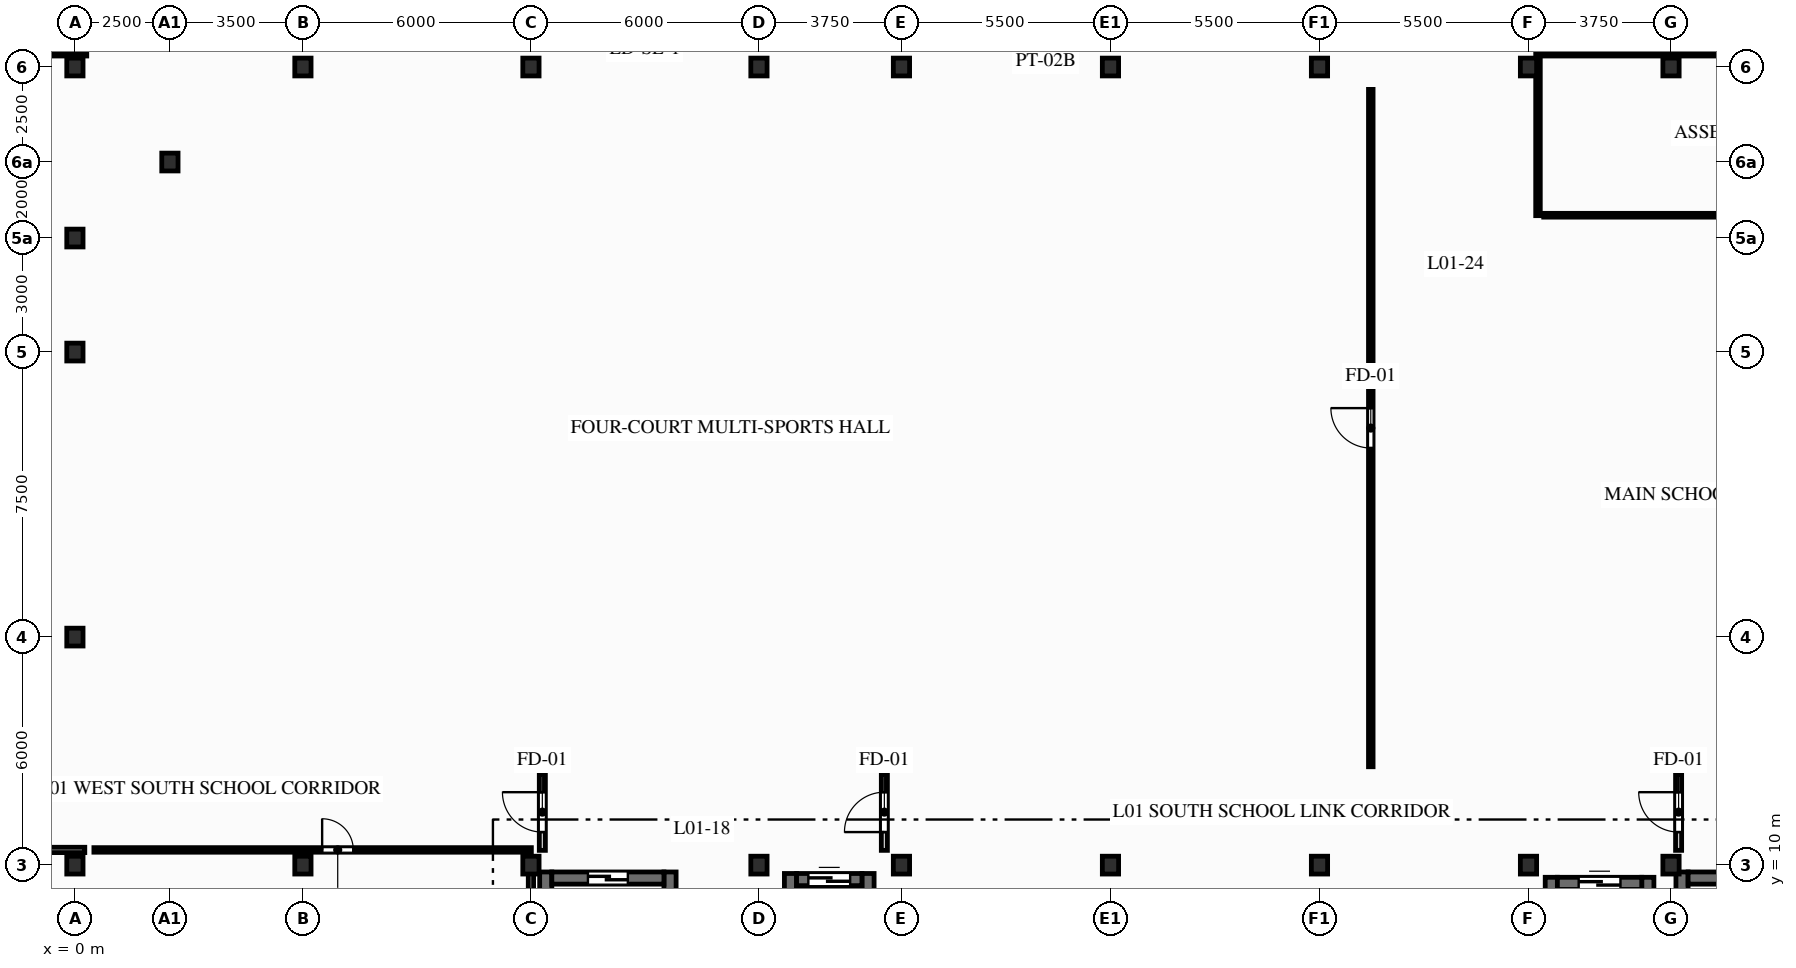
"""IFC4 building model, lengths in metres.
Left out: names, types, materials, properties, quantities, classifications, styles, units other than length and angle.
Written with IfcOpenShell. Run it as: python <this file> out.ifc"""

import sys

from ifc_helpers import new_model, si_unit, direction, frame, frame_2d, origin, origin_2d, place, context, subcontext, project, spatial, rectangle, i_section, extrude, element, fill, save


model = new_model("IFC4")
c1 = context("Model", 3, precision=1e-05, world=origin(), true_north=direction((0.0, 1.0)))
c2 = subcontext(c1, "Body", "Model", "MODEL_VIEW")
j1 = project(units=[si_unit("LENGTHUNIT", "METRE"), si_unit("PLANEANGLEUNIT", "RADIAN")], contexts=[c1])
p1 = place(None, origin())
s1 = spatial("IfcSite", under=j1, at=p1, CompositionType="ELEMENT")
p2 = place(p1, origin())
s2 = spatial("IfcBuilding", under=s1, at=p2, CompositionType="ELEMENT")
p3 = place(p2, frame((0.0, 0.0, 4.5)))
s3 = spatial("IfcBuildingStorey", under=s2, at=p3, CompositionType="ELEMENT", Elevation=4.5)
for number, where, z_axis, x_axis in (
    (1, (0.0, 10.0, 0.0), (0.0, 0.0, 1.0), (1.0, 0.0, 0.0)),
    (2, (0.0, 16.0, 0.0), (0.0, 0.0, 1.0), (1.0, 0.0, 0.0)),
    (3, (0.0, 23.5, 0.0), (0.0, 0.0, 1.0), (1.0, 0.0, 0.0)),
    (4, (0.0, 26.5, 0.0), (0.0, 0.0, 1.0), (1.0, 0.0, 0.0)),
    (5, (0.0, 31.0, 0.0), (0.0, 0.0, 1.0), (1.0, 0.0, 0.0)),
    (6, (2.5, 28.5, 0.0), (0.0, 0.0, 1.0), (1.0, 0.0, 0.0)),
    (7, (6.0, 10.0, 0.0), (0.0, 0.0, 1.0), (1.0, 0.0, 0.0)),
    (8, (6.0, 31.0, 0.0), (0.0, 0.0, 1.0), (1.0, 0.0, 0.0)),
    (9, (12.0, 10.0, 0.0), (0.0, 0.0, 1.0), (1.0, 0.0, 0.0)),
    (10, (12.0, 31.0, 0.0), (0.0, 0.0, 1.0), (1.0, 0.0, 0.0)),
    (11, (18.0, 10.0, 0.0), (0.0, 0.0, 1.0), (1.0, 0.0, 0.0)),
    (12, (18.0, 31.0, 0.0), (0.0, 0.0, 1.0), (1.0, 0.0, 0.0)),
    (13, (21.75, 10.0, 0.0), (0.0, 0.0, 1.0), (1.0, 0.0, 0.0)),
    (14, (21.75, 31.0, 0.0), (0.0, 0.0, 1.0), (1.0, 0.0, 0.0)),
    (15, (27.25, 10.0, 0.0), (0.0, 0.0, 1.0), (1.0, 0.0, 0.0)),
    (16, (27.25, 31.0, 0.0), (0.0, 0.0, 1.0), (1.0, 0.0, 0.0)),
    (17, (32.75, 10.0, 0.0), (0.0, 0.0, 1.0), (1.0, 0.0, 0.0)),
    (18, (32.75, 31.0, 0.0), (0.0, 0.0, 1.0), (1.0, 0.0, 0.0)),
    (19, (38.25, 10.0, 0.0), (0.0, 0.0, 1.0), (1.0, 0.0, 0.0)),
    (20, (38.25, 31.0, 0.0), (0.0, 0.0, 1.0), (1.0, 0.0, 0.0)),
    (21, (42.0, 10.0, 0.0), (0.0, 0.0, 1.0), (1.0, 0.0, 0.0)),
    (22, (42.0, 31.0, 0.0), (0.0, 0.0, 1.0), (1.0, 0.0, 0.0)),
):
    element("IfcColumn", number, at=place(p3, frame(where, z_axis=z_axis, x_axis=x_axis)), inside=s3, PredefinedType="COLUMN", context=c2, shape_type="SweptSolid", body=[
        extrude(i_section(OverallWidth=0.428, OverallDepth=0.469, WebThickness=0.078, FlangeThickness=0.125, FilletRadius=0.015, at=origin_2d()), origin(), (0.0, 0.0, 1.0), 4.5),
    ])
for number, where, z_axis, x_axis in (
    (23, (12.39, 2.46, 0.0), (0.0, 0.0, 1.0), (0.0, 1.0, 0.0)),
    (24, (15.66, 2.46, 0.0), (0.0, 0.0, 1.0), (0.0, 1.0, 0.0)),
):
    element("IfcWall", number, at=place(p3, frame(where, z_axis=z_axis, x_axis=x_axis)), inside=s3, PredefinedType="SHEAR", context=c2, shape_type="SweptSolid", body=[
        extrude(rectangle(XDim=7.36, YDim=0.32, at=frame_2d((3.68, 0.0))), origin(), (0.0, 0.0, 1.0), 4.22),
    ])
p4 = place(p3, frame((15.5, 9.66, 0.0), z_axis=(0.0, 0.0, 1.0), x_axis=(-1.0, 0.0, 0.0)))
e25 = element("IfcWall", 25, at=p4, inside=s3, PredefinedType="SHEAR", context=c2, shape_type="SweptSolid", body=[
    extrude(rectangle(XDim=2.95, YDim=0.32, at=frame_2d((1.475, 0.0))), origin(), (0.0, 0.0, 1.0), 4.22),
])
p5 = place(p4, frame((0.95, 0.0, 0.0)))
e26 = element("IfcOpeningElement", 26, at=p5, cuts=e25, PredefinedType="OPENING", context=c2, shape_type="SweptSolid", body=[
    extrude(rectangle(XDim=1.05, YDim=2.06, at=frame_2d((0.525, 1.03))), frame((0.0, 0.17, 0.0), z_axis=(0.0, -1.0, 0.0), x_axis=(1.0, 0.0, 0.0)), (0.0, 0.0, 1.0), 0.34),
])
p6 = place(p3, frame((42.29, 2.46, 0.0), z_axis=(0.0, 0.0, 1.0), x_axis=(0.0, 1.0, 0.0)))
e27 = element("IfcWall", 27, at=p6, inside=s3, PredefinedType="SHEAR", context=c2, shape_type="SweptSolid", body=[
    extrude(rectangle(XDim=7.36, YDim=0.32, at=frame_2d((3.68, 0.0))), origin(), (0.0, 0.0, 1.0), 4.22),
])
p7 = place(p3, frame((45.4, 9.66, 0.0), z_axis=(0.0, 0.0, 1.0), x_axis=(-1.0, 0.0, 0.0)))
e28 = element("IfcWall", 28, at=p7, inside=s3, PredefinedType="SHEAR", context=c2, shape_type="SweptSolid", body=[
    extrude(rectangle(XDim=2.95, YDim=0.32, at=frame_2d((1.475, 0.0))), origin(), (0.0, 0.0, 1.0), 4.22),
])
p8 = place(p7, frame((0.95, 0.0, 0.0)))
e29 = element("IfcOpeningElement", 29, at=p8, cuts=e28, PredefinedType="OPENING", context=c2, shape_type="SweptSolid", body=[
    extrude(rectangle(XDim=1.05, YDim=2.06, at=frame_2d((0.525, 1.03))), frame((0.0, 0.17, 0.0), z_axis=(0.0, -1.0, 0.0), x_axis=(1.0, 0.0, 0.0)), (0.0, 0.0, 1.0), 0.34),
])
for number, where, z_axis, x_axis in (
    (30, (18.83, 6.92, 0.0), (0.0, 0.0, 1.0), (0.0, 1.0, 0.0)),
    (31, (20.87, 6.92, 0.0), (0.0, 0.0, 1.0), (0.0, 1.0, 0.0)),
):
    element("IfcWall", number, at=place(p3, frame(where, z_axis=z_axis, x_axis=x_axis)), inside=s3, PredefinedType="SHEAR", context=c2, shape_type="SweptSolid", body=[
        extrude(rectangle(XDim=2.86, YDim=0.32, at=frame_2d((1.43, 0.0))), origin(), (0.0, 0.0, 1.0), 4.22),
    ])
p9 = place(p3, frame((18.99, 9.62, 0.0), z_axis=(0.0, 0.0, 1.0), x_axis=(1.0, 0.0, 0.0)))
e32 = element("IfcWall", 32, at=p9, inside=s3, PredefinedType="SHEAR", context=c2, shape_type="SweptSolid", body=[
    extrude(rectangle(XDim=1.72, YDim=0.32, at=frame_2d((0.86, 0.0))), origin(), (0.0, 0.0, 1.0), 4.22),
])
p10 = place(p9, frame((0.31, 0.0, 0.0)))
e33 = element("IfcOpeningElement", 33, at=p10, cuts=e32, PredefinedType="OPENING", context=c2, shape_type="SweptSolid", body=[
    extrude(rectangle(XDim=1.1, YDim=2.06, at=frame_2d((0.55, 1.03))), frame((0.0, 0.17, 0.0), z_axis=(0.0, -1.0, 0.0), x_axis=(1.0, 0.0, 0.0)), (0.0, 0.0, 1.0), 0.34),
])
for number, where, z_axis, x_axis in (
    (34, (38.85, 7.32, 0.0), (0.0, 0.0, 1.0), (0.0, 1.0, 0.0)),
    (35, (41.39, 7.32, 0.0), (0.0, 0.0, 1.0), (0.0, 1.0, 0.0)),
):
    element("IfcWall", number, at=place(p3, frame(where, z_axis=z_axis, x_axis=x_axis)), inside=s3, PredefinedType="SHEAR", context=c2, shape_type="SweptSolid", body=[
        extrude(rectangle(XDim=2.36, YDim=0.32, at=frame_2d((1.18, 0.0))), origin(), (0.0, 0.0, 1.0), 4.22),
    ])
p11 = place(p3, frame((39.01, 9.52, 0.0), z_axis=(0.0, 0.0, 1.0), x_axis=(1.0, 0.0, 0.0)))
e36 = element("IfcWall", 36, at=p11, inside=s3, PredefinedType="SHEAR", context=c2, shape_type="SweptSolid", body=[
    extrude(rectangle(XDim=2.22, YDim=0.32, at=frame_2d((1.11, 0.0))), origin(), (0.0, 0.0, 1.0), 4.22),
])
p12 = place(p11, frame((0.56, 0.0, 0.0)))
e37 = element("IfcOpeningElement", 37, at=p12, cuts=e36, PredefinedType="OPENING", context=c2, shape_type="SweptSolid", body=[
    extrude(rectangle(XDim=1.1, YDim=2.06, at=frame_2d((0.55, 1.03))), frame((0.0, 0.17, 0.0), z_axis=(0.0, -1.0, 0.0), x_axis=(1.0, 0.0, 0.0)), (0.0, 0.0, 1.0), 0.34),
])
p13 = place(p3, frame((12.3, 10.389, 0.0), z_axis=(0.0, 0.0, 1.0), x_axis=(0.0, 1.0, 0.0)))
e38 = element("IfcWall", 38, at=p13, inside=s3, PredefinedType="PARTITIONING", context=c2, shape_type="SweptSolid", body=[
    extrude(rectangle(XDim=2.011, YDim=0.16, at=frame_2d((1.006, 0.0))), origin(), (0.0, 0.0, 1.0), 4.22),
])
p14 = place(p13, frame((0.481, 0.0, 0.0)))
e39 = element("IfcOpeningElement", 39, at=p14, cuts=e38, PredefinedType="OPENING", context=c2, shape_type="SweptSolid", body=[
    extrude(rectangle(XDim=1.05, YDim=2.06, at=frame_2d((0.525, 1.03))), frame((0.0, 0.09, 0.0), z_axis=(0.0, -1.0, 0.0), x_axis=(1.0, 0.0, 0.0)), (0.0, 0.0, 1.0), 0.18),
])
p15 = place(p3, frame((21.3, 10.389, 0.0), z_axis=(0.0, 0.0, 1.0), x_axis=(0.0, 1.0, 0.0)))
e40 = element("IfcWall", 40, at=p15, inside=s3, PredefinedType="PARTITIONING", context=c2, shape_type="SweptSolid", body=[
    extrude(rectangle(XDim=2.011, YDim=0.16, at=frame_2d((1.006, 0.0))), origin(), (0.0, 0.0, 1.0), 4.22),
])
p16 = place(p15, frame((0.481, 0.0, 0.0)))
e41 = element("IfcOpeningElement", 41, at=p16, cuts=e40, PredefinedType="OPENING", context=c2, shape_type="SweptSolid", body=[
    extrude(rectangle(XDim=1.05, YDim=2.06, at=frame_2d((0.525, 1.03))), frame((0.0, 0.09, 0.0), z_axis=(0.0, -1.0, 0.0), x_axis=(1.0, 0.0, 0.0)), (0.0, 0.0, 1.0), 0.18),
])
p17 = place(p3, frame((42.2, 10.389, 0.0), z_axis=(0.0, 0.0, 1.0), x_axis=(0.0, 1.0, 0.0)))
e42 = element("IfcWall", 42, at=p17, inside=s3, PredefinedType="PARTITIONING", context=c2, shape_type="SweptSolid", body=[
    extrude(rectangle(XDim=2.011, YDim=0.16, at=frame_2d((1.006, 0.0))), origin(), (0.0, 0.0, 1.0), 4.22),
])
p18 = place(p17, frame((0.481, 0.0, 0.0)))
e43 = element("IfcOpeningElement", 43, at=p18, cuts=e42, PredefinedType="OPENING", context=c2, shape_type="SweptSolid", body=[
    extrude(rectangle(XDim=1.05, YDim=2.06, at=frame_2d((0.525, 1.03))), frame((0.0, 0.09, 0.0), z_axis=(0.0, -1.0, 0.0), x_axis=(1.0, 0.0, 0.0)), (0.0, 0.0, 1.0), 0.18),
])
p19 = place(p3, frame((38.493, 31.35, 0.0), z_axis=(0.0, 0.0, 1.0), x_axis=(1.0, 0.0, 0.0)))
e44 = element("IfcWall", 44, at=p19, inside=s3, PredefinedType="PARTITIONING", context=c2, shape_type="SweptSolid", body=[
    extrude(rectangle(XDim=21.319, YDim=0.12, at=frame_2d((10.659, 0.0))), origin(), (0.0, 0.0, 1.0), 3.268),
])
p20 = place(p19, frame((10.059, 0.0, 0.0)))
e45 = element("IfcOpeningElement", 45, at=p20, cuts=e44, PredefinedType="OPENING", context=c2, shape_type="SweptSolid", body=[
    extrude(rectangle(XDim=1.2, YDim=2.08, at=frame_2d((0.6, 1.04))), frame((0.0, 0.07, 0.0), z_axis=(0.0, -1.0, 0.0), x_axis=(1.0, 0.0, 0.0)), (0.0, 0.0, 1.0), 0.14),
])
p21 = place(p3, frame((-5.2, 31.35, 0.0), z_axis=(0.0, 0.0, 1.0), x_axis=(1.0, 0.0, 0.0)))
e46 = element("IfcWall", 46, at=p21, inside=s3, PredefinedType="PARTITIONING", context=c2, shape_type="SweptSolid", body=[
    extrude(rectangle(XDim=5.511, YDim=0.12, at=frame_2d((2.756, 0.0))), origin(), (0.0, 0.0, 1.0), 4.22),
])
p22 = place(p21, frame((2.156, 0.0, 0.0)))
e47 = element("IfcOpeningElement", 47, at=p22, cuts=e46, PredefinedType="OPENING", context=c2, shape_type="SweptSolid", body=[
    extrude(rectangle(XDim=1.2, YDim=2.08, at=frame_2d((0.6, 1.04))), frame((0.0, 0.07, 0.0), z_axis=(0.0, -1.0, 0.0), x_axis=(1.0, 0.0, 0.0)), (0.0, 0.0, 1.0), 0.14),
])
p23 = place(p3, frame((0.5, 10.4, 0.0), z_axis=(0.0, 0.0, 1.0), x_axis=(1.0, 0.0, 0.0)))
e48 = element("IfcWall", 48, at=p23, inside=s3, PredefinedType="PARTITIONING", context=c2, shape_type="SweptSolid", body=[
    extrude(rectangle(XDim=11.511, YDim=0.12, at=frame_2d((5.756, 0.0))), origin(), (0.0, 0.0, 1.0), 4.22),
])
p24 = place(p23, frame((6.006, 0.0, 0.0)))
e49 = element("IfcOpeningElement", 49, at=p24, cuts=e48, PredefinedType="OPENING", context=c2, shape_type="SweptSolid", body=[
    extrude(rectangle(XDim=0.82, YDim=2.02, at=frame_2d((0.41, 1.01))), frame((0.0, 0.07, 0.0), z_axis=(0.0, -1.0, 0.0), x_axis=(1.0, 0.0, 0.0)), (0.0, 0.0, 1.0), 0.14),
])
p25 = place(p3, frame((34.1, 12.589, 0.0), z_axis=(0.0, 0.0, 1.0), x_axis=(0.0, 1.0, 0.0)))
e50 = element("IfcWall", 50, at=p25, inside=s3, PredefinedType="PARTITIONING", context=c2, shape_type="SweptSolid", body=[
    extrude(rectangle(XDim=17.823, YDim=0.12, at=frame_2d((8.911, 0.0))), origin(), (0.0, 0.0, 1.0), 4.22),
])
p26 = place(p25, frame((8.386, 0.0, 0.0)))
e51 = element("IfcOpeningElement", 51, at=p26, cuts=e50, PredefinedType="OPENING", context=c2, shape_type="SweptSolid", body=[
    extrude(rectangle(XDim=1.05, YDim=2.06, at=frame_2d((0.525, 1.03))), frame((0.0, 0.07, 0.0), z_axis=(0.0, -1.0, 0.0), x_axis=(1.0, 0.0, 0.0)), (0.0, 0.0, 1.0), 0.14),
])
p27 = place(p3, frame((38.5, 27.089, 0.0), z_axis=(0.0, 0.0, 1.0), x_axis=(0.0, 1.0, 0.0)))
e52 = element("IfcWall", 52, at=p27, inside=s3, PredefinedType="PARTITIONING", context=c2, shape_type="SweptSolid", body=[
    extrude(rectangle(XDim=4.257, YDim=0.12, at=frame_2d((2.129, 0.0))), origin(), (0.0, 0.0, 1.0), 3.268),
])
p28 = place(p3, frame((38.65, 27.1, 0.0), z_axis=(0.0, 0.0, 1.0), x_axis=(1.0, 0.0, 0.0)))
e53 = element("IfcWall", 53, at=p28, inside=s3, PredefinedType="PARTITIONING", context=c2, shape_type="SweptSolid", body=[
    extrude(rectangle(XDim=20.85, YDim=0.1, at=frame_2d((10.425, 0.0))), origin(), (0.0, 0.0, 1.0), 4.22),
])
p29 = place(p28, frame((10.015, 0.0, 0.0)))
e54 = element("IfcOpeningElement", 54, at=p29, cuts=e53, PredefinedType="OPENING", context=c2, shape_type="SweptSolid", body=[
    extrude(rectangle(XDim=0.82, YDim=2.02, at=frame_2d((0.41, 1.01))), frame((0.0, 0.06, 0.0), z_axis=(0.0, -1.0, 0.0), x_axis=(1.0, 0.0, 0.0)), (0.0, 0.0, 1.0), 0.12),
])
p30 = place(p3, frame((12.0, -1.59, 0.0), z_axis=(0.0, 0.0, 1.0), x_axis=(0.0, 1.0, 0.0)))
e55 = element("IfcWall", 55, at=p30, inside=s3, PredefinedType="PARTITIONING", context=c2, shape_type="SweptSolid", body=[
    extrude(rectangle(XDim=11.75, YDim=0.14, at=frame_2d((5.875, 0.0))), origin(), (0.0, 0.0, 1.0), 3.268),
])
p31 = place(p3, frame((-10.59, 10.4, 0.0), z_axis=(0.0, 0.0, 1.0), x_axis=(1.0, 0.0, 0.0)))
e56 = element("IfcWall", 56, at=p31, inside=s3, PredefinedType="PARTITIONING", context=c2, shape_type="SweptSolid", body=[
    extrude(rectangle(XDim=10.85, YDim=0.14, at=frame_2d((5.425, 0.0))), origin(), (0.0, 0.0, 1.0), 3.268),
])
p32 = place(p5, origin())
e57 = element("IfcDoor", 57, at=p32, inside=s3, OperationType="SINGLE_SWING_LEFT", PredefinedType="DOOR", context=c2, shape_type="SweptSolid", body=[
    extrude(rectangle(XDim=1.05, YDim=2.06, at=frame_2d((0.525, 1.03))), frame((0.0, 0.025, 0.0), z_axis=(0.0, -1.0, 0.0), x_axis=(1.0, 0.0, 0.0)), (0.0, 0.0, 1.0), 0.05),
])
fill(e26, e57)
p33 = place(p10, origin())
e58 = element("IfcDoor", 58, at=p33, inside=s3, OperationType="SLIDING_TO_LEFT", PredefinedType="DOOR", context=c2, shape_type="SweptSolid", body=[
    extrude(rectangle(XDim=1.1, YDim=2.06, at=frame_2d((0.55, 1.03))), frame((0.0, 0.025, 0.0), z_axis=(0.0, -1.0, 0.0), x_axis=(1.0, 0.0, 0.0)), (0.0, 0.0, 1.0), 0.05),
])
fill(e33, e58)
p34 = place(p12, origin())
e59 = element("IfcDoor", 59, at=p34, inside=s3, OperationType="SLIDING_TO_LEFT", PredefinedType="DOOR", context=c2, shape_type="SweptSolid", body=[
    extrude(rectangle(XDim=1.1, YDim=2.06, at=frame_2d((0.55, 1.03))), frame((0.0, 0.025, 0.0), z_axis=(0.0, -1.0, 0.0), x_axis=(1.0, 0.0, 0.0)), (0.0, 0.0, 1.0), 0.05),
])
fill(e37, e59)
p35 = place(p14, origin())
e60 = element("IfcDoor", 60, at=p35, inside=s3, OperationType="SINGLE_SWING_RIGHT", PredefinedType="DOOR", context=c2, shape_type="SweptSolid", body=[
    extrude(rectangle(XDim=1.05, YDim=2.06, at=frame_2d((0.525, 1.03))), frame((0.0, 0.025, 0.0), z_axis=(0.0, -1.0, 0.0), x_axis=(1.0, 0.0, 0.0)), (0.0, 0.0, 1.0), 0.05),
])
fill(e39, e60)
p36 = place(p16, origin())
e61 = element("IfcDoor", 61, at=p36, inside=s3, OperationType="SINGLE_SWING_LEFT", PredefinedType="DOOR", context=c2, shape_type="SweptSolid", body=[
    extrude(rectangle(XDim=1.05, YDim=2.06, at=frame_2d((0.525, 1.03))), frame((0.0, 0.025, 0.0), z_axis=(0.0, -1.0, 0.0), x_axis=(1.0, 0.0, 0.0)), (0.0, 0.0, 1.0), 0.05),
])
fill(e41, e61)
p37 = place(p18, origin())
e62 = element("IfcDoor", 62, at=p37, inside=s3, OperationType="SINGLE_SWING_RIGHT", PredefinedType="DOOR", context=c2, shape_type="SweptSolid", body=[
    extrude(rectangle(XDim=1.05, YDim=2.06, at=frame_2d((0.525, 1.03))), frame((0.0, 0.025, 0.0), z_axis=(0.0, -1.0, 0.0), x_axis=(1.0, 0.0, 0.0)), (0.0, 0.0, 1.0), 0.05),
])
fill(e43, e62)
p38 = place(p24, origin())
e63 = element("IfcDoor", 63, at=p38, inside=s3, OperationType="SINGLE_SWING_LEFT", PredefinedType="DOOR", context=c2, shape_type="SweptSolid", body=[
    extrude(rectangle(XDim=0.82, YDim=2.02, at=frame_2d((0.41, 1.01))), frame((0.0, 0.025, 0.0), z_axis=(0.0, -1.0, 0.0), x_axis=(1.0, 0.0, 0.0)), (0.0, 0.0, 1.0), 0.05),
])
fill(e49, e63)
p39 = place(p26, origin())
e64 = element("IfcDoor", 64, at=p39, inside=s3, OperationType="SINGLE_SWING_RIGHT", PredefinedType="DOOR", context=c2, shape_type="SweptSolid", body=[
    extrude(rectangle(XDim=1.05, YDim=2.06, at=frame_2d((0.525, 1.03))), frame((0.0, 0.025, 0.0), z_axis=(0.0, -1.0, 0.0), x_axis=(1.0, 0.0, 0.0)), (0.0, 0.0, 1.0), 0.05),
])
fill(e51, e64)
save(model, sys.argv[1])
